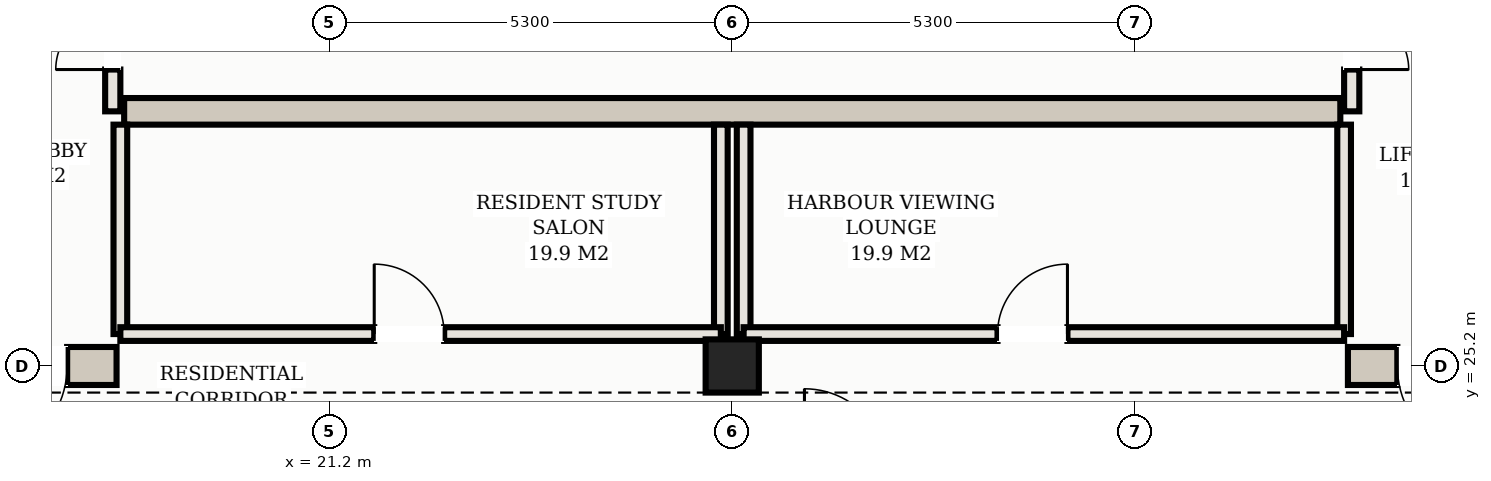
"""IFC4 building model, lengths in metres.
Left out: names, types, materials, properties, quantities, classifications, styles, units other than length and angle.
Written with IfcOpenShell. Run it as: python <this file> out.ifc"""

import sys

from ifc_helpers import new_model, si_unit, direction, frame, frame_2d, origin, origin_2d, place, context, subcontext, project, spatial, rectangle, hollow_rectangle, extrude, element, fill, save


model = new_model("IFC4")
c1 = context("Model", 3, precision=1e-05, world=origin(), true_north=direction((0.0, 1.0)))
c2 = subcontext(c1, "Body", "Model", "MODEL_VIEW")
j1 = project(units=[si_unit("LENGTHUNIT", "METRE"), si_unit("PLANEANGLEUNIT", "RADIAN")], contexts=[c1])
p1 = place(None, origin())
s1 = spatial("IfcSite", under=j1, at=p1, CompositionType="ELEMENT")
p2 = place(p1, origin())
s2 = spatial("IfcBuilding", under=s1, at=p2, CompositionType="ELEMENT")
p3 = place(p2, frame((0.0, 0.0, 252.8)))
s3 = spatial("IfcBuildingStorey", under=s2, at=p3, CompositionType="ELEMENT", Elevation=252.8)
p4 = place(p3, frame((10.35, 25.2, 0.0), z_axis=(0.0, 0.0, 1.0), x_axis=(1.0, 0.0, 0.0)))
e1 = element("IfcWall", 1, at=p4, inside=s3, PredefinedType="SHEAR", context=c2, shape_type="SweptSolid", body=[
    extrude(rectangle(XDim=8.05, YDim=0.5, at=frame_2d((4.025, 0.0))), origin(), (0.0, 0.0, 1.0), 3.11),
])
p5 = place(p4, frame((6.15, 0.0, 0.0)))
e2 = element("IfcOpeningElement", 2, at=p5, cuts=e1, PredefinedType="OPENING", context=c2, shape_type="SweptSolid", body=[
    extrude(rectangle(XDim=1.25, YDim=2.2, at=frame_2d((0.625, 1.1))), frame((0.0, 0.26, 0.0), z_axis=(0.0, -1.0, 0.0), x_axis=(1.0, 0.0, 0.0)), (0.0, 0.0, 1.0), 0.52),
])
p6 = place(p3, frame((34.6, 25.2, 0.0), z_axis=(0.0, 0.0, 1.0), x_axis=(1.0, 0.0, 0.0)))
e3 = element("IfcWall", 3, at=p6, inside=s3, PredefinedType="SHEAR", context=c2, shape_type="SweptSolid", body=[
    extrude(rectangle(XDim=8.05, YDim=0.5, at=frame_2d((4.025, 0.0))), origin(), (0.0, 0.0, 1.0), 3.11),
])
p7 = place(p6, frame((0.65, 0.0, 0.0)))
e4 = element("IfcOpeningElement", 4, at=p7, cuts=e3, PredefinedType="OPENING", context=c2, shape_type="SweptSolid", body=[
    extrude(rectangle(XDim=1.25, YDim=2.2, at=frame_2d((0.625, 1.1))), frame((0.0, 0.26, 0.0), z_axis=(0.0, -1.0, 0.0), x_axis=(1.0, 0.0, 0.0)), (0.0, 0.0, 1.0), 0.52),
])
p8 = place(p3, frame((18.5, 28.55, 0.0), z_axis=(0.0, 0.0, 1.0), x_axis=(1.0, 0.0, 0.0)))
e5 = element("IfcWall", 5, at=p8, inside=s3, PredefinedType="SHEAR", context=c2, shape_type="SweptSolid", body=[
    extrude(rectangle(XDim=16.0, YDim=0.35, at=frame_2d((8.0, 0.0))), origin(), (0.0, 0.0, 1.0), 3.11),
])
p9 = place(p3, frame((26.5, 25.2, 0.0), z_axis=(0.0, 0.0, 1.0), x_axis=(1.0, 0.0, 0.0)))
e6 = element("IfcColumn", 6, at=p9, inside=s3, PredefinedType="COLUMN", context=c2, shape_type="SweptSolid", body=[
    extrude(hollow_rectangle(XDim=0.7, YDim=0.7, WallThickness=0.025, at=origin_2d()), origin(), (0.0, 0.0, 1.0), 3.3),
])
p10 = place(p3, frame((18.35, 28.55, 0.0), z_axis=(0.0, 0.0, 1.0), x_axis=(0.0, 1.0, 0.0)))
e7 = element("IfcWall", 7, at=p10, inside=s3, PredefinedType="PARTITIONING", context=c2, shape_type="SweptSolid", body=[
    extrude(rectangle(XDim=2.6, YDim=0.2, at=frame_2d((1.3, 0.0))), origin(), (0.0, 0.0, 1.0), 2.45),
])
p11 = place(p10, frame((0.55, 0.0, 0.0)))
e8 = element("IfcOpeningElement", 8, at=p11, cuts=e7, PredefinedType="OPENING", context=c2, shape_type="SweptSolid", body=[
    extrude(rectangle(XDim=1.5, YDim=2.25, at=frame_2d((0.75, 1.125))), frame((0.0, 0.11, 0.0), z_axis=(0.0, -1.0, 0.0), x_axis=(1.0, 0.0, 0.0)), (0.0, 0.0, 1.0), 0.22),
])
p12 = place(p3, frame((34.65, 28.55, 0.0), z_axis=(0.0, 0.0, 1.0), x_axis=(0.0, 1.0, 0.0)))
e9 = element("IfcWall", 9, at=p12, inside=s3, PredefinedType="PARTITIONING", context=c2, shape_type="SweptSolid", body=[
    extrude(rectangle(XDim=2.6, YDim=0.2, at=frame_2d((1.3, 0.0))), origin(), (0.0, 0.0, 1.0), 2.45),
])
p13 = place(p12, frame((0.55, 0.0, 0.0)))
e10 = element("IfcOpeningElement", 10, at=p13, cuts=e9, PredefinedType="OPENING", context=c2, shape_type="SweptSolid", body=[
    extrude(rectangle(XDim=1.5, YDim=2.25, at=frame_2d((0.75, 1.125))), frame((0.0, 0.11, 0.0), z_axis=(0.0, -1.0, 0.0), x_axis=(1.0, 0.0, 0.0)), (0.0, 0.0, 1.0), 0.22),
])
for number, where, z_axis, x_axis in (
    (11, (18.45, 25.62, 0.0), (0.0, 0.0, 1.0), (0.0, 1.0, 0.0)),
    (12, (26.35, 25.62, 0.0), (0.0, 0.0, 1.0), (0.0, 1.0, 0.0)),
):
    element("IfcWall", number, at=place(p3, frame(where, z_axis=z_axis, x_axis=x_axis)), inside=s3, PredefinedType="PARTITIONING", context=c2, shape_type="SweptSolid", body=[
        extrude(rectangle(XDim=2.755, YDim=0.18, at=frame_2d((1.377, 0.0))), origin(), (0.0, 0.0, 1.0), 2.45),
    ])
p14 = place(p3, frame((18.45, 25.62, 0.0), z_axis=(0.0, 0.0, 1.0), x_axis=(1.0, 0.0, 0.0)))
e13 = element("IfcWall", 13, at=p14, inside=s3, PredefinedType="PARTITIONING", context=c2, shape_type="SweptSolid", body=[
    extrude(rectangle(XDim=7.9, YDim=0.18, at=frame_2d((3.95, 0.0))), origin(), (0.0, 0.0, 1.0), 2.45),
])
p15 = place(p14, frame((3.34, 0.0, 0.0)))
e14 = element("IfcOpeningElement", 14, at=p15, cuts=e13, PredefinedType="OPENING", context=c2, shape_type="SweptSolid", body=[
    extrude(rectangle(XDim=0.92, YDim=2.15, at=frame_2d((0.46, 1.075))), frame((0.0, 0.1, 0.0), z_axis=(0.0, -1.0, 0.0), x_axis=(1.0, 0.0, 0.0)), (0.0, 0.0, 1.0), 0.2),
])
for number, where, z_axis, x_axis in (
    (15, (26.65, 25.62, 0.0), (0.0, 0.0, 1.0), (0.0, 1.0, 0.0)),
    (16, (34.55, 25.62, 0.0), (0.0, 0.0, 1.0), (0.0, 1.0, 0.0)),
):
    element("IfcWall", number, at=place(p3, frame(where, z_axis=z_axis, x_axis=x_axis)), inside=s3, PredefinedType="PARTITIONING", context=c2, shape_type="SweptSolid", body=[
        extrude(rectangle(XDim=2.755, YDim=0.18, at=frame_2d((1.377, 0.0))), origin(), (0.0, 0.0, 1.0), 2.45),
    ])
p16 = place(p3, frame((26.65, 25.62, 0.0), z_axis=(0.0, 0.0, 1.0), x_axis=(1.0, 0.0, 0.0)))
e17 = element("IfcWall", 17, at=p16, inside=s3, PredefinedType="PARTITIONING", context=c2, shape_type="SweptSolid", body=[
    extrude(rectangle(XDim=7.9, YDim=0.18, at=frame_2d((3.95, 0.0))), origin(), (0.0, 0.0, 1.0), 2.45),
])
p17 = place(p16, frame((3.34, 0.0, 0.0)))
e18 = element("IfcOpeningElement", 18, at=p17, cuts=e17, PredefinedType="OPENING", context=c2, shape_type="SweptSolid", body=[
    extrude(rectangle(XDim=0.92, YDim=2.15, at=frame_2d((0.46, 1.075))), frame((0.0, 0.1, 0.0), z_axis=(0.0, -1.0, 0.0), x_axis=(1.0, 0.0, 0.0)), (0.0, 0.0, 1.0), 0.2),
])
p18 = place(p5, frame((1.25, 0.0, 0.0), z_axis=(0.0, 0.0, 1.0), x_axis=(-1.0, 0.0, 0.0)))
e19 = element("IfcDoor", 19, at=p18, inside=s3, OperationType="SINGLE_SWING_RIGHT", PredefinedType="DOOR", context=c2, shape_type="SweptSolid", body=[
    extrude(rectangle(XDim=1.25, YDim=2.2, at=frame_2d((0.625, 1.1))), frame((0.0, 0.025, 0.0), z_axis=(0.0, -1.0, 0.0), x_axis=(1.0, 0.0, 0.0)), (0.0, 0.0, 1.0), 0.05),
])
fill(e2, e19)
p19 = place(p7, frame((1.25, 0.0, 0.0), z_axis=(0.0, 0.0, 1.0), x_axis=(-1.0, 0.0, 0.0)))
e20 = element("IfcDoor", 20, at=p19, inside=s3, OperationType="SINGLE_SWING_LEFT", PredefinedType="DOOR", context=c2, shape_type="SweptSolid", body=[
    extrude(rectangle(XDim=1.25, YDim=2.2, at=frame_2d((0.625, 1.1))), frame((0.0, 0.025, 0.0), z_axis=(0.0, -1.0, 0.0), x_axis=(1.0, 0.0, 0.0)), (0.0, 0.0, 1.0), 0.05),
])
fill(e4, e20)
p20 = place(p11, origin())
e21 = element("IfcDoor", 21, at=p20, inside=s3, OperationType="DOUBLE_DOOR_SINGLE_SWING", PredefinedType="DOOR", context=c2, shape_type="SweptSolid", body=[
    extrude(rectangle(XDim=1.5, YDim=2.25, at=frame_2d((0.75, 1.125))), frame((0.0, 0.025, 0.0), z_axis=(0.0, -1.0, 0.0), x_axis=(1.0, 0.0, 0.0)), (0.0, 0.0, 1.0), 0.05),
])
fill(e8, e21)
p21 = place(p13, frame((1.5, 0.0, 0.0), z_axis=(0.0, 0.0, 1.0), x_axis=(-1.0, 0.0, 0.0)))
e22 = element("IfcDoor", 22, at=p21, inside=s3, OperationType="DOUBLE_DOOR_SINGLE_SWING", PredefinedType="DOOR", context=c2, shape_type="SweptSolid", body=[
    extrude(rectangle(XDim=1.5, YDim=2.25, at=frame_2d((0.75, 1.125))), frame((0.0, 0.025, 0.0), z_axis=(0.0, -1.0, 0.0), x_axis=(1.0, 0.0, 0.0)), (0.0, 0.0, 1.0), 0.05),
])
fill(e10, e22)
p22 = place(p15, origin())
e23 = element("IfcDoor", 23, at=p22, inside=s3, OperationType="SINGLE_SWING_LEFT", PredefinedType="DOOR", context=c2, shape_type="SweptSolid", body=[
    extrude(rectangle(XDim=0.92, YDim=2.15, at=frame_2d((0.46, 1.075))), frame((0.0, 0.025, 0.0), z_axis=(0.0, -1.0, 0.0), x_axis=(1.0, 0.0, 0.0)), (0.0, 0.0, 1.0), 0.05),
])
fill(e14, e23)
p23 = place(p17, origin())
e24 = element("IfcDoor", 24, at=p23, inside=s3, OperationType="SINGLE_SWING_RIGHT", PredefinedType="DOOR", context=c2, shape_type="SweptSolid", body=[
    extrude(rectangle(XDim=0.92, YDim=2.15, at=frame_2d((0.46, 1.075))), frame((0.0, 0.025, 0.0), z_axis=(0.0, -1.0, 0.0), x_axis=(1.0, 0.0, 0.0)), (0.0, 0.0, 1.0), 0.05),
])
fill(e18, e24)
save(model, sys.argv[1])
